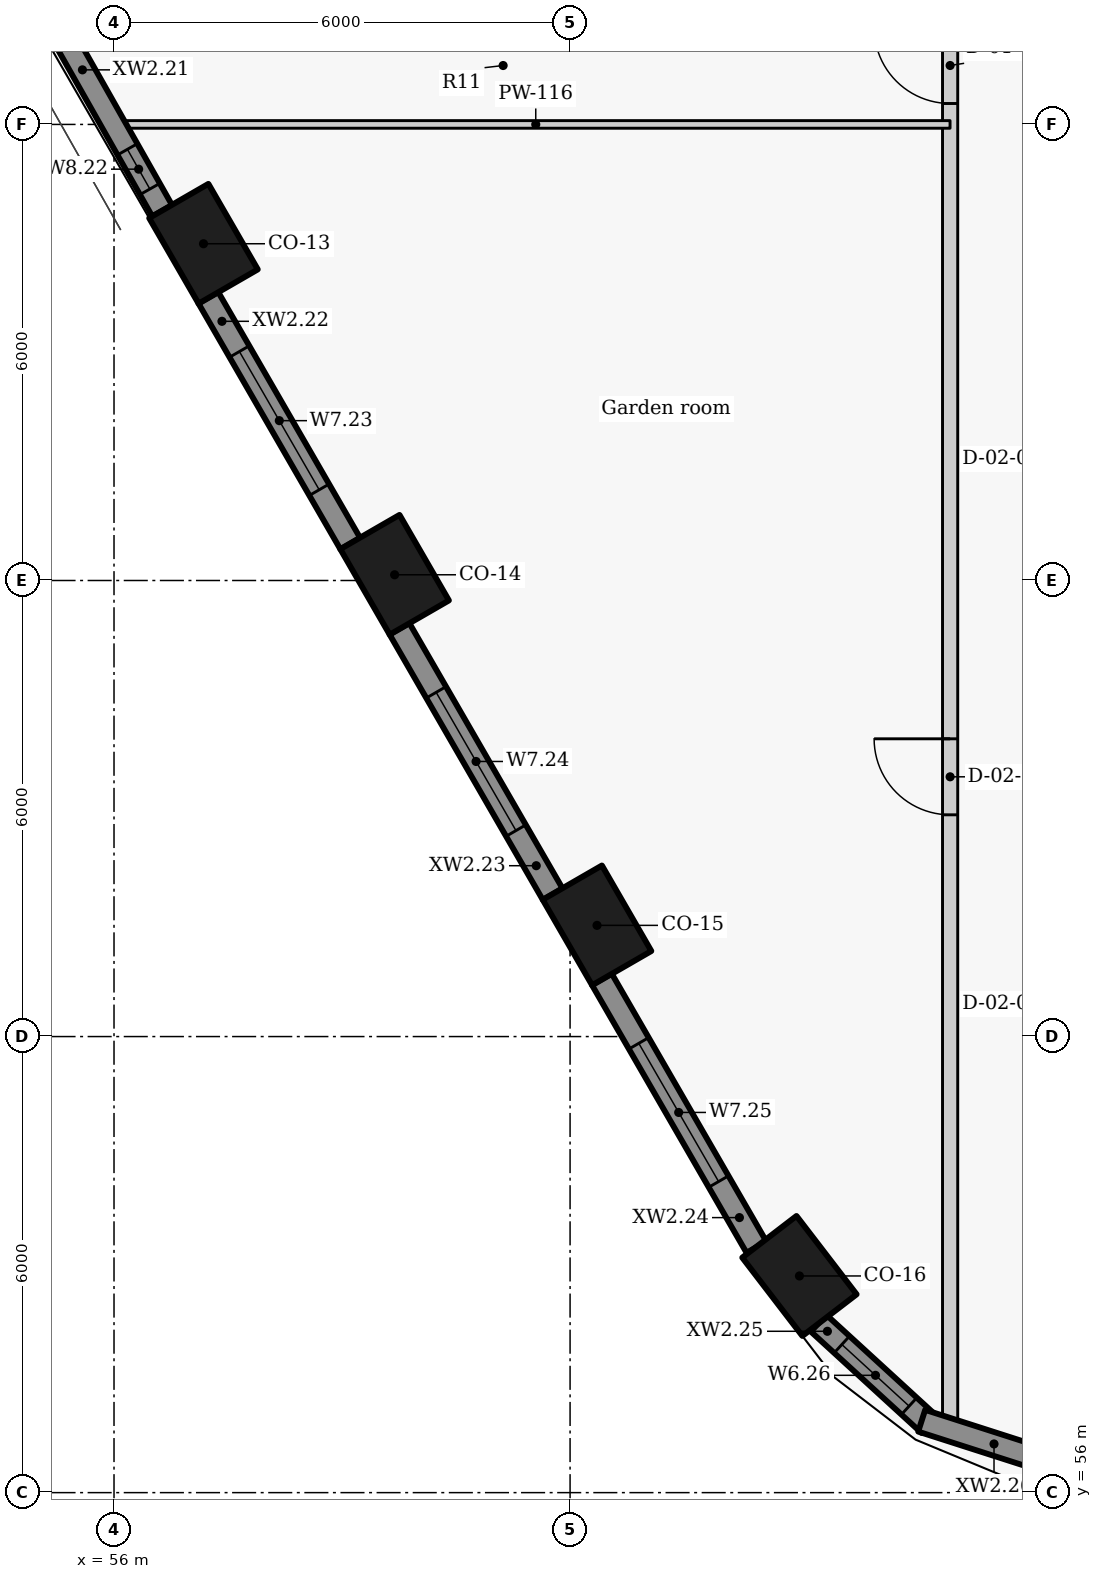
"""IFC4 building model, lengths in metres.
Left out: names, types, materials, properties, quantities, classifications, styles, units other than length and angle.
Written with IfcOpenShell. Run it as: python <this file> out.ifc"""

import sys

from ifc_helpers import new_model, si_unit, direction, frame, frame_2d, origin, origin_2d, place, context, subcontext, project, spatial, rectangle, extrude, element, fill, save


model = new_model("IFC4")
c1 = context("Model", 3, precision=1e-05, world=origin(), true_north=direction((0.0, 1.0)))
c2 = subcontext(c1, "Body", "Model", "MODEL_VIEW")
j1 = project(units=[si_unit("LENGTHUNIT", "METRE"), si_unit("PLANEANGLEUNIT", "RADIAN")], contexts=[c1])
p1 = place(None, origin())
s1 = spatial("IfcSite", under=j1, at=p1, CompositionType="ELEMENT")
p2 = place(p1, origin())
s2 = spatial("IfcBuilding", under=s1, at=p2, CompositionType="ELEMENT")
p3 = place(p2, frame((0.0, 0.0, 130.5)))
s3 = spatial("IfcBuildingStorey", under=s2, at=p3, CompositionType="ELEMENT", Elevation=130.5)
for number, where, z_axis, x_axis in (
    (1, (57.177, 72.43, 0.0), (0.0, 0.0, 1.0), (0.5, -0.866, 0.0)),
    (2, (59.692, 68.075, 0.0), (0.0, 0.0, 1.0), (0.5, -0.866, 0.0)),
    (3, (62.354, 63.463, 0.0), (0.0, 0.0, 1.0), (0.5, -0.866, 0.0)),
    (4, (65.018, 58.851, 0.0), (0.0, 0.0, 1.0), (0.609, -0.793, 0.0)),
):
    element("IfcColumn", number, at=place(p3, frame(where, z_axis=z_axis, x_axis=x_axis)), inside=s3, PredefinedType="COLUMN", context=c2, shape_type="SweptSolid", body=[
        extrude(rectangle(XDim=1.3, YDim=0.9, at=origin_2d()), origin(), (0.0, 0.0, 1.0), 3.3),
    ])
p4 = place(p3, frame((53.814, 77.847, 0.0), z_axis=(0.0, 0.0, 1.0), x_axis=(0.492498306264, -0.87031340236, 0.0)))
e5 = element("IfcWall", 5, at=p4, inside=s3, PredefinedType="SOLIDWALL", context=c2, shape_type="SweptSolid", body=[
    extrude(rectangle(XDim=5.727, YDim=0.3, at=frame_2d((2.863, 0.0))), origin(), (0.0, 0.0, 1.0), 2.425),
])
p5 = place(p4, frame((0.894, 0.0, 0.9)))
e6 = element("IfcOpeningElement", 6, at=p5, cuts=e5, PredefinedType="OPENING", context=c2, shape_type="SweptSolid", body=[
    extrude(rectangle(XDim=1.5, YDim=1.1, at=frame_2d((0.75, 0.55))), frame((0.0, 0.16, 0.0), z_axis=(0.0, -1.0, 0.0), x_axis=(1.0, 0.0, 0.0)), (0.0, 0.0, 1.0), 0.32),
])
p6 = place(p4, frame((4.796, 0.0, 0.9)))
e7 = element("IfcOpeningElement", 7, at=p6, cuts=e5, PredefinedType="OPENING", context=c2, shape_type="SweptSolid", body=[
    extrude(rectangle(XDim=0.6, YDim=1.1, at=frame_2d((0.3, 0.55))), frame((0.0, 0.16, 0.0), z_axis=(0.0, -1.0, 0.0), x_axis=(1.0, 0.0, 0.0)), (0.0, 0.0, 1.0), 0.32),
])
p7 = place(p3, frame((57.24, 71.721, 0.0), z_axis=(0.0, 0.0, 1.0), x_axis=(0.499933594891, -0.866063739398, 0.0)))
e8 = element("IfcWall", 8, at=p7, inside=s3, PredefinedType="SOLIDWALL", context=c2, shape_type="SweptSolid", body=[
    extrude(rectangle(XDim=3.737, YDim=0.3, at=frame_2d((1.868, 0.0))), origin(), (0.0, 0.0, 1.0), 2.425),
])
p8 = place(p7, frame((0.818, 0.0, 0.9)))
e9 = element("IfcOpeningElement", 9, at=p8, cuts=e8, PredefinedType="OPENING", context=c2, shape_type="SweptSolid", body=[
    extrude(rectangle(XDim=2.1, YDim=1.1, at=frame_2d((1.05, 0.55))), frame((0.0, 0.16, 0.0), z_axis=(0.0, -1.0, 0.0), x_axis=(1.0, 0.0, 0.0)), (0.0, 0.0, 1.0), 0.32),
])
p9 = place(p3, frame((59.755, 67.366, 0.0), z_axis=(0.0, 0.0, 1.0), x_axis=(0.500031546601, -0.86600718958, 0.0)))
e10 = element("IfcWall", 10, at=p9, inside=s3, PredefinedType="SOLIDWALL", context=c2, shape_type="SweptSolid", body=[
    extrude(rectangle(XDim=4.034, YDim=0.3, at=frame_2d((2.017, 0.0))), origin(), (0.0, 0.0, 1.0), 2.425),
])
p10 = place(p9, frame((0.967, 0.0, 0.9)))
e11 = element("IfcOpeningElement", 11, at=p10, cuts=e10, PredefinedType="OPENING", context=c2, shape_type="SweptSolid", body=[
    extrude(rectangle(XDim=2.1, YDim=1.1, at=frame_2d((1.05, 0.55))), frame((0.0, 0.16, 0.0), z_axis=(0.0, -1.0, 0.0), x_axis=(1.0, 0.0, 0.0)), (0.0, 0.0, 1.0), 0.32),
])
p11 = place(p3, frame((62.418, 62.753, 0.0), z_axis=(0.0, 0.0, 1.0), x_axis=(0.500018589245, -0.866014671013, 0.0)))
e12 = element("IfcWall", 12, at=p11, inside=s3, PredefinedType="SOLIDWALL", context=c2, shape_type="SweptSolid", body=[
    extrude(rectangle(XDim=4.068, YDim=0.3, at=frame_2d((2.034, 0.0))), origin(), (0.0, 0.0, 1.0), 2.425),
])
p12 = place(p11, frame((0.973, 0.0, 0.9)))
e13 = element("IfcOpeningElement", 13, at=p12, cuts=e12, PredefinedType="OPENING", context=c2, shape_type="SweptSolid", body=[
    extrude(rectangle(XDim=2.1, YDim=1.1, at=frame_2d((1.05, 0.55))), frame((0.0, 0.16, 0.0), z_axis=(0.0, -1.0, 0.0), x_axis=(1.0, 0.0, 0.0)), (0.0, 0.0, 1.0), 0.32),
])
p13 = place(p3, frame((65.269, 58.229, 0.0), z_axis=(0.0, 0.0, 1.0), x_axis=(0.737487298625, -0.675361002995, 0.0)))
e14 = element("IfcWall", 14, at=p13, inside=s3, PredefinedType="SOLIDWALL", context=c2, shape_type="SweptSolid", body=[
    extrude(rectangle(XDim=1.977, YDim=0.3, at=frame_2d((0.988, 0.0))), origin(), (0.0, 0.0, 1.0), 2.425),
])
p14 = place(p13, frame((0.416, 0.0, 0.9)))
e15 = element("IfcOpeningElement", 15, at=p14, cuts=e14, PredefinedType="OPENING", context=c2, shape_type="SweptSolid", body=[
    extrude(rectangle(XDim=1.2, YDim=1.1, at=frame_2d((0.6, 0.55))), frame((0.0, 0.16, 0.0), z_axis=(0.0, -1.0, 0.0), x_axis=(1.0, 0.0, 0.0)), (0.0, 0.0, 1.0), 0.32),
])
p15 = place(p3, frame((66.626, 56.946, 0.0), z_axis=(0.0, 0.0, 1.0), x_axis=(0.952201240673, -0.305471434444, 0.0)))
e16 = element("IfcWall", 16, at=p15, inside=s3, PredefinedType="SOLIDWALL", context=c2, shape_type="SweptSolid", body=[
    extrude(rectangle(XDim=1.999, YDim=0.3, at=frame_2d((1.0, 0.0))), origin(), (0.0, 0.0, 1.0), 2.425),
])
p16 = place(p3, frame((67.0, 56.833, 0.0), z_axis=(0.0, 0.0, 1.0), x_axis=(0.0, 1.0, 0.0)))
e17 = element("IfcWall", 17, at=p16, inside=s3, PredefinedType="PARTITIONING", context=c2, shape_type="SweptSolid", body=[
    extrude(rectangle(XDim=45.661, YDim=0.2, at=frame_2d((22.831, 0.0))), origin(), (0.0, 0.0, 1.0), 2.405),
])
p17 = place(p16, frame((8.084, 0.0, 0.0)))
e18 = element("IfcOpeningElement", 18, at=p17, cuts=e17, PredefinedType="OPENING", context=c2, shape_type="SweptSolid", body=[
    extrude(rectangle(XDim=1.0, YDim=2.1, at=frame_2d((0.5, 1.05))), frame((0.0, 0.11, 0.0), z_axis=(0.0, -1.0, 0.0), x_axis=(1.0, 0.0, 0.0)), (0.0, 0.0, 1.0), 0.22),
])
p18 = place(p16, frame((17.442, 0.0, 0.0)))
e19 = element("IfcOpeningElement", 19, at=p18, cuts=e17, PredefinedType="OPENING", context=c2, shape_type="SweptSolid", body=[
    extrude(rectangle(XDim=1.0, YDim=2.1, at=frame_2d((0.5, 1.05))), frame((0.0, 0.11, 0.0), z_axis=(0.0, -1.0, 0.0), x_axis=(1.0, 0.0, 0.0)), (0.0, 0.0, 1.0), 0.22),
])
p19 = place(p16, frame((36.45, 0.0, 0.0)))
e20 = element("IfcOpeningElement", 20, at=p19, cuts=e17, PredefinedType="OPENING", context=c2, shape_type="SweptSolid", body=[
    extrude(rectangle(XDim=1.0, YDim=2.1, at=frame_2d((0.5, 1.05))), frame((0.0, 0.11, 0.0), z_axis=(0.0, -1.0, 0.0), x_axis=(1.0, 0.0, 0.0)), (0.0, 0.0, 1.0), 0.22),
])
p20 = place(p16, frame((41.203, 0.0, 0.0)))
e21 = element("IfcOpeningElement", 21, at=p20, cuts=e17, PredefinedType="OPENING", context=c2, shape_type="SweptSolid", body=[
    extrude(rectangle(XDim=1.0, YDim=2.1, at=frame_2d((0.5, 1.05))), frame((0.0, 0.11, 0.0), z_axis=(0.0, -1.0, 0.0), x_axis=(1.0, 0.0, 0.0)), (0.0, 0.0, 1.0), 0.22),
])
p21 = place(p3, frame((56.098, 74.0, 0.0), z_axis=(0.0, 0.0, 1.0), x_axis=(1.0, 0.0, 0.0)))
e22 = element("IfcWall", 22, at=p21, inside=s3, PredefinedType="PARTITIONING", context=c2, shape_type="SweptSolid", body=[
    extrude(rectangle(XDim=10.901, YDim=0.1, at=frame_2d((5.451, 0.0))), origin(), (0.0, 0.0, 1.0), 2.405),
])
p22 = place(p6, origin())
e23 = element("IfcWindow", 23, at=p22, inside=s3, PartitioningType="SINGLE_PANEL", PredefinedType="WINDOW", context=c2, shape_type="SweptSolid", body=[
    extrude(rectangle(XDim=0.6, YDim=1.1, at=frame_2d((0.3, 0.55))), frame((0.0, 0.03, 0.0), z_axis=(0.0, -1.0, 0.0), x_axis=(1.0, 0.0, 0.0)), (0.0, 0.0, 1.0), 0.06),
])
fill(e7, e23)
p23 = place(p8, origin())
e24 = element("IfcWindow", 24, at=p23, inside=s3, PartitioningType="SINGLE_PANEL", PredefinedType="WINDOW", context=c2, shape_type="SweptSolid", body=[
    extrude(rectangle(XDim=2.1, YDim=1.1, at=frame_2d((1.05, 0.55))), frame((0.0, 0.03, 0.0), z_axis=(0.0, -1.0, 0.0), x_axis=(1.0, 0.0, 0.0)), (0.0, 0.0, 1.0), 0.06),
])
fill(e9, e24)
p24 = place(p10, origin())
e25 = element("IfcWindow", 25, at=p24, inside=s3, PartitioningType="SINGLE_PANEL", PredefinedType="WINDOW", context=c2, shape_type="SweptSolid", body=[
    extrude(rectangle(XDim=2.1, YDim=1.1, at=frame_2d((1.05, 0.55))), frame((0.0, 0.03, 0.0), z_axis=(0.0, -1.0, 0.0), x_axis=(1.0, 0.0, 0.0)), (0.0, 0.0, 1.0), 0.06),
])
fill(e11, e25)
p25 = place(p12, origin())
e26 = element("IfcWindow", 26, at=p25, inside=s3, PartitioningType="SINGLE_PANEL", PredefinedType="WINDOW", context=c2, shape_type="SweptSolid", body=[
    extrude(rectangle(XDim=2.1, YDim=1.1, at=frame_2d((1.05, 0.55))), frame((0.0, 0.03, 0.0), z_axis=(0.0, -1.0, 0.0), x_axis=(1.0, 0.0, 0.0)), (0.0, 0.0, 1.0), 0.06),
])
fill(e13, e26)
p26 = place(p14, origin())
e27 = element("IfcWindow", 27, at=p26, inside=s3, PartitioningType="SINGLE_PANEL", PredefinedType="WINDOW", context=c2, shape_type="SweptSolid", body=[
    extrude(rectangle(XDim=1.2, YDim=1.1, at=frame_2d((0.6, 0.55))), frame((0.0, 0.03, 0.0), z_axis=(0.0, -1.0, 0.0), x_axis=(1.0, 0.0, 0.0)), (0.0, 0.0, 1.0), 0.06),
])
fill(e15, e27)
p27 = place(p17, origin())
e28 = element("IfcDoor", 28, at=p27, inside=s3, OperationType="SINGLE_SWING_RIGHT", PredefinedType="DOOR", context=c2, shape_type="SweptSolid", body=[
    extrude(rectangle(XDim=1.0, YDim=2.1, at=frame_2d((0.5, 1.05))), frame((0.0, 0.025, 0.0), z_axis=(0.0, -1.0, 0.0), x_axis=(1.0, 0.0, 0.0)), (0.0, 0.0, 1.0), 0.05),
])
fill(e18, e28)
p28 = place(p18, origin())
e29 = element("IfcDoor", 29, at=p28, inside=s3, OperationType="SINGLE_SWING_RIGHT", PredefinedType="DOOR", context=c2, shape_type="SweptSolid", body=[
    extrude(rectangle(XDim=1.0, YDim=2.1, at=frame_2d((0.5, 1.05))), frame((0.0, 0.025, 0.0), z_axis=(0.0, -1.0, 0.0), x_axis=(1.0, 0.0, 0.0)), (0.0, 0.0, 1.0), 0.05),
])
fill(e19, e29)
save(model, sys.argv[1])
